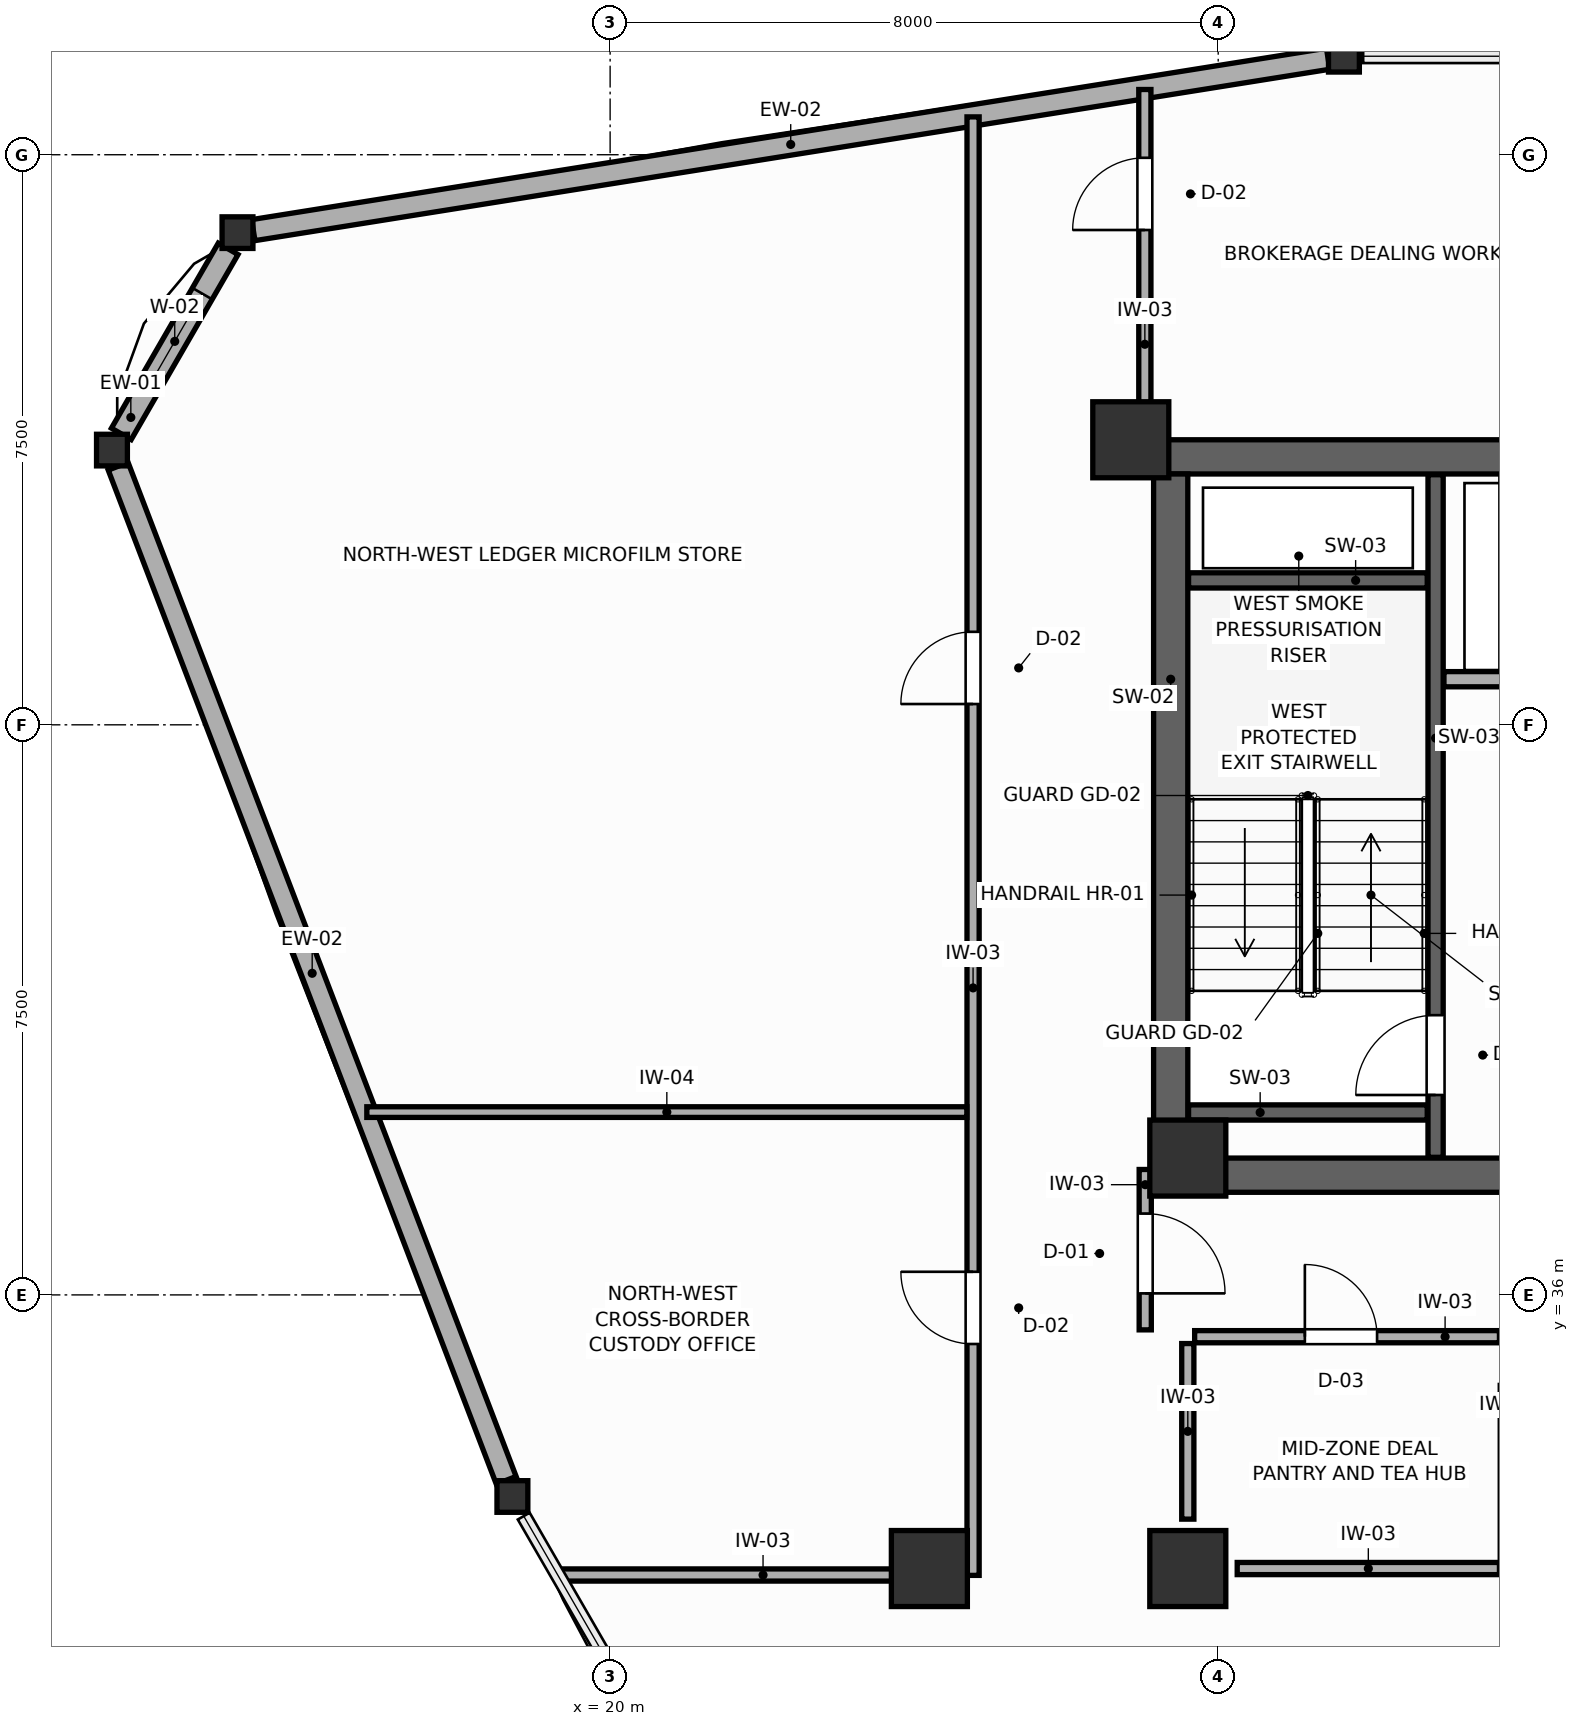
"""IFC4 building model, lengths in metres.
Left out: names, types, materials, properties, quantities, classifications, styles, units other than length and angle.
Written with IfcOpenShell. Run it as: python <this file> out.ifc"""

import sys

from ifc_helpers import new_model, si_unit, direction, frame, frame_2d, origin, origin_2d, place, context, subcontext, project, spatial, rectangle, i_section, extrude, source, transform, mapped, element, fill, save


model = new_model("IFC4")
c1 = context("Model", 3, precision=1e-05, world=origin(), true_north=direction((0.0, 1.0)))
c2 = subcontext(c1, "Body", "Model", "MODEL_VIEW")
j1 = project(units=[si_unit("LENGTHUNIT", "METRE"), si_unit("PLANEANGLEUNIT", "RADIAN")], contexts=[c1])
p1 = place(None, origin())
s1 = spatial("IfcSite", under=j1, at=p1, CompositionType="ELEMENT")
p2 = place(p1, origin())
s2 = spatial("IfcBuilding", under=s1, at=p2, CompositionType="ELEMENT")
p3 = place(p2, frame((0.0, 0.0, 172.2)))
s3 = spatial("IfcBuildingStorey", under=s2, at=p3, CompositionType="ELEMENT", Elevation=172.2)
p4 = place(p3, frame((27.15, 47.025, 0.0), z_axis=(0.0, 0.0, 1.0), x_axis=(1.0, 0.0, 0.0)))
e1 = element("IfcWall", 1, at=p4, inside=s3, PredefinedType="SHEAR", context=c2, shape_type="SweptSolid", body=[
    extrude(rectangle(XDim=17.7, YDim=0.45, at=frame_2d((8.85, 0.0))), origin(), (0.0, 0.0, 1.0), 3.6),
])
p5 = place(p3, frame((27.15, 37.575, 0.0), z_axis=(0.0, 0.0, 1.0), x_axis=(1.0, 0.0, 0.0)))
e2 = element("IfcWall", 2, at=p5, inside=s3, PredefinedType="SHEAR", context=c2, shape_type="SweptSolid", body=[
    extrude(rectangle(XDim=17.7, YDim=0.45, at=frame_2d((8.85, 0.0))), origin(), (0.0, 0.0, 1.0), 3.6),
])
p6 = place(p5, frame((4.875, 0.0, 0.0)))
e3 = element("IfcOpeningElement", 3, at=p6, cuts=e2, PredefinedType="OPENING", context=c2, shape_type="SweptSolid", body=[
    extrude(rectangle(XDim=1.05, YDim=2.1, at=frame_2d((0.525, 1.05))), frame((0.0, 0.235, 0.0), z_axis=(0.0, -1.0, 0.0), x_axis=(1.0, 0.0, 0.0)), (0.0, 0.0, 1.0), 0.47),
])
p7 = place(p5, frame((11.775, 0.0, 0.0)))
e4 = element("IfcOpeningElement", 4, at=p7, cuts=e2, PredefinedType="OPENING", context=c2, shape_type="SweptSolid", body=[
    extrude(rectangle(XDim=1.05, YDim=2.1, at=frame_2d((0.525, 1.05))), frame((0.0, 0.235, 0.0), z_axis=(0.0, -1.0, 0.0), x_axis=(1.0, 0.0, 0.0)), (0.0, 0.0, 1.0), 0.47),
])
p8 = place(p3, frame((27.375, 37.8, 0.0), z_axis=(0.0, 0.0, 1.0), x_axis=(0.0, 1.0, 0.0)))
e5 = element("IfcWall", 5, at=p8, inside=s3, PredefinedType="SHEAR", context=c2, shape_type="SweptSolid", body=[
    extrude(rectangle(XDim=9.0, YDim=0.45, at=frame_2d((4.5, 0.0))), origin(), (0.0, 0.0, 1.0), 3.6),
])
m1 = source(origin(), c2, "Body", "SweptSolid", [
    extrude(rectangle(XDim=1.0, YDim=1.0, at=origin_2d()), origin(), (0.0, 0.0, 1.0), 3.6),
])
for number, where, z_axis, x_axis in (
    (6, (26.85, 47.25, 0.0), (0.0, 0.0, 1.0), (1.0, 0.0, 0.0)),
    (7, (27.6, 37.8, 0.0), (0.0, 0.0, 1.0), (1.0, 0.0, 0.0)),
    (8, (27.6, 32.4, 0.0), (0.0, 0.0, 1.0), (1.0, 0.0, 0.0)),
    (9, (24.2, 32.4, 0.0), (0.0, 0.0, 1.0), (1.0, 0.0, 0.0)),
):
    element("IfcColumn", number, at=place(p3, frame(where, z_axis=z_axis, x_axis=x_axis)), inside=s3, PredefinedType="COLUMN", context=c2, shape_type="MappedRepresentation", body=[
        mapped(m1, transform((0.0, 0.0, 0.0), scale=1.0)),
    ])
m2 = source(origin(), c2, "Body", "SweptSolid", [
    extrude(i_section(OverallWidth=0.406, OverallDepth=0.416, WebThickness=0.027, FlangeThickness=0.044, FilletRadius=0.015, at=origin_2d()), origin(), (0.0, 0.0, 1.0), 3.6),
])
for number, where, z_axis, x_axis in (
    (10, (29.654, 52.296, 0.0), (0.0, 0.0, 1.0), (1.0, 0.0, 0.0)),
    (11, (15.098, 49.975, 0.0), (0.0, 0.0, 1.0), (1.0, 0.0, 0.0)),
    (12, (13.446, 47.115, 0.0), (0.0, 0.0, 1.0), (1.0, 0.0, 0.0)),
    (13, (18.714, 33.348, 0.0), (0.0, 0.0, 1.0), (1.0, 0.0, 0.0)),
):
    element("IfcColumn", number, at=place(p3, frame(where, z_axis=z_axis, x_axis=x_axis)), inside=s3, PredefinedType="COLUMN", context=c2, shape_type="MappedRepresentation", body=[
        mapped(m2, transform((0.0, 0.0, 0.0), scale=1.0)),
    ])
p9 = place(p3, frame((29.446, 52.263, 0.0), z_axis=(0.0, 0.0, 1.0), x_axis=(-0.987528363291, -0.157441200757, 0.0)))
e14 = element("IfcWall", 14, at=p9, inside=s3, PredefinedType="SOLIDWALL", context=c2, shape_type="SweptSolid", body=[
    extrude(rectangle(XDim=14.319, YDim=0.28, at=frame_2d((7.159, 0.0))), origin(), (0.0, 0.0, 1.0), 2.95),
])
p10 = place(p3, frame((14.975, 49.762, 0.0), z_axis=(0.0, 0.0, 1.0), x_axis=(-0.499978056798, -0.866038072327, 0.0)))
e15 = element("IfcWall", 15, at=p10, inside=s3, PredefinedType="SOLIDWALL", context=c2, shape_type="SweptSolid", body=[
    extrude(rectangle(XDim=2.811, YDim=0.3, at=frame_2d((1.406, 0.0))), origin(), (0.0, 0.0, 1.0), 3.01),
])
p11 = place(p10, frame((0.681, 0.0, 0.75)))
e16 = element("IfcOpeningElement", 16, at=p11, cuts=e15, PredefinedType="OPENING", context=c2, shape_type="SweptSolid", body=[
    extrude(rectangle(XDim=1.45, YDim=1.65, at=frame_2d((0.725, 0.825))), frame((0.0, 0.16, 0.0), z_axis=(0.0, -1.0, 0.0), x_axis=(1.0, 0.0, 0.0)), (0.0, 0.0, 1.0), 0.32),
])
p12 = place(p3, frame((13.528, 46.901, 0.0), z_axis=(0.0, 0.0, 1.0), x_axis=(0.357407179744, -0.933948664471, 0.0)))
e17 = element("IfcWall", 17, at=p12, inside=s3, PredefinedType="SOLIDWALL", context=c2, shape_type="SweptSolid", body=[
    extrude(rectangle(XDim=14.284, YDim=0.28, at=frame_2d((7.142, 0.0))), origin(), (0.0, 0.0, 1.0), 2.95),
])
p13 = place(p3, frame((30.86, 37.81, 0.0), z_axis=(0.0, 0.0, 1.0), x_axis=(0.0, 1.0, 0.0)))
e18 = element("IfcWall", 18, at=p13, inside=s3, PredefinedType="SHEAR", context=c2, shape_type="SweptSolid", body=[
    extrude(rectangle(XDim=8.98, YDim=0.2, at=frame_2d((4.49, 0.0))), origin(), (0.0, 0.0, 1.0), 3.6),
])
p14 = place(p13, frame((0.82, 0.0, 0.0)))
e19 = element("IfcOpeningElement", 19, at=p14, cuts=e18, PredefinedType="OPENING", context=c2, shape_type="SweptSolid", body=[
    extrude(rectangle(XDim=1.05, YDim=2.1, at=frame_2d((0.525, 1.05))), frame((0.0, 0.11, 0.0), z_axis=(0.0, -1.0, 0.0), x_axis=(1.0, 0.0, 0.0)), (0.0, 0.0, 1.0), 0.22),
])
for number, where, z_axis, x_axis in (
    (20, (27.61, 45.4, 0.0), (0.0, 0.0, 1.0), (1.0, 0.0, 0.0)),
    (21, (27.61, 38.4, 0.0), (0.0, 0.0, 1.0), (1.0, 0.0, 0.0)),
):
    element("IfcWall", number, at=place(p3, frame(where, z_axis=z_axis, x_axis=x_axis)), inside=s3, PredefinedType="SHEAR", context=c2, shape_type="SweptSolid", body=[
        extrude(rectangle(XDim=3.14, YDim=0.2, at=frame_2d((1.57, 0.0))), origin(), (0.0, 0.0, 1.0), 3.6),
    ])
p15 = place(p3, frame((30.97, 44.1, 0.0), z_axis=(0.0, 0.0, 1.0), x_axis=(1.0, 0.0, 0.0)))
e22 = element("IfcWall", 22, at=p15, inside=s3, PredefinedType="PARTITIONING", context=c2, shape_type="SweptSolid", body=[
    extrude(rectangle(XDim=3.38, YDim=0.2, at=frame_2d((1.69, 0.0))), origin(), (0.0, 0.0, 1.0), 3.4),
])
p16 = place(p15, frame((0.9, 0.0, 0.0)))
e23 = element("IfcOpeningElement", 23, at=p16, cuts=e22, PredefinedType="OPENING", context=c2, shape_type="SweptSolid", body=[
    extrude(rectangle(XDim=1.2, YDim=2.1, at=frame_2d((0.6, 1.05))), frame((0.0, 0.11, 0.0), z_axis=(0.0, -1.0, 0.0), x_axis=(1.0, 0.0, 0.0)), (0.0, 0.0, 1.0), 0.22),
])
p17 = place(p3, frame((28.25, 32.4, 0.0), z_axis=(0.0, 0.0, 1.0), x_axis=(1.0, 0.0, 0.0)))
e24 = element("IfcWall", 24, at=p17, inside=s3, PredefinedType="PARTITIONING", context=c2, shape_type="SweptSolid", body=[
    extrude(rectangle(XDim=3.45, YDim=0.16, at=frame_2d((1.725, 0.0))), origin(), (0.0, 0.0, 1.0), 2.95),
])
p18 = place(p3, frame((27.6, 33.05, 0.0), z_axis=(0.0, 0.0, 1.0), x_axis=(0.0, 1.0, 0.0)))
e25 = element("IfcWall", 25, at=p18, inside=s3, PredefinedType="PARTITIONING", context=c2, shape_type="SweptSolid", body=[
    extrude(rectangle(XDim=2.31, YDim=0.16, at=frame_2d((1.155, 0.0))), origin(), (0.0, 0.0, 1.0), 3.4),
])
p19 = place(p3, frame((27.69, 35.45, 0.0), z_axis=(0.0, 0.0, 1.0), x_axis=(1.0, 0.0, 0.0)))
e26 = element("IfcWall", 26, at=p19, inside=s3, PredefinedType="PARTITIONING", context=c2, shape_type="SweptSolid", body=[
    extrude(rectangle(XDim=4.01, YDim=0.16, at=frame_2d((2.005, 0.0))), origin(), (0.0, 0.0, 1.0), 3.4),
])
p20 = place(p19, frame((1.45, 0.0, 0.0)))
e27 = element("IfcOpeningElement", 27, at=p20, cuts=e26, PredefinedType="OPENING", context=c2, shape_type="SweptSolid", body=[
    extrude(rectangle(XDim=0.95, YDim=2.05, at=frame_2d((0.475, 1.025))), frame((0.0, 0.09, 0.0), z_axis=(0.0, -1.0, 0.0), x_axis=(1.0, 0.0, 0.0)), (0.0, 0.0, 1.0), 0.18),
])
p21 = place(p3, frame((27.04, 35.54, 0.0), z_axis=(0.0, 0.0, 1.0), x_axis=(0.0, 1.0, 0.0)))
e28 = element("IfcWall", 28, at=p21, inside=s3, PredefinedType="PARTITIONING", context=c2, shape_type="SweptSolid", body=[
    extrude(rectangle(XDim=2.11, YDim=0.16, at=frame_2d((1.055, 0.0))), origin(), (0.0, 0.0, 1.0), 3.4),
])
p22 = place(p21, frame((0.48, 0.0, 0.0)))
e29 = element("IfcOpeningElement", 29, at=p22, cuts=e28, PredefinedType="OPENING", context=c2, shape_type="SweptSolid", body=[
    extrude(rectangle(XDim=1.05, YDim=2.1, at=frame_2d((0.525, 1.05))), frame((0.0, 0.09, 0.0), z_axis=(0.0, -1.0, 0.0), x_axis=(1.0, 0.0, 0.0)), (0.0, 0.0, 1.0), 0.18),
])
p23 = place(p3, frame((24.775, 32.31, 0.0), z_axis=(0.0, 0.0, 1.0), x_axis=(0.0, 1.0, 0.0)))
e30 = element("IfcWall", 30, at=p23, inside=s3, PredefinedType="PARTITIONING", context=c2, shape_type="SweptSolid", body=[
    extrude(rectangle(XDim=19.188, YDim=0.16, at=frame_2d((9.594, 0.0))), origin(), (0.0, 0.0, 1.0), 3.4),
])
p24 = place(p23, frame((3.044, 0.0, 0.0)))
e31 = element("IfcOpeningElement", 31, at=p24, cuts=e30, PredefinedType="OPENING", context=c2, shape_type="SweptSolid", body=[
    extrude(rectangle(XDim=0.95, YDim=2.05, at=frame_2d((0.475, 1.025))), frame((0.0, 0.09, 0.0), z_axis=(0.0, -1.0, 0.0), x_axis=(1.0, 0.0, 0.0)), (0.0, 0.0, 1.0), 0.18),
])
p25 = place(p23, frame((11.463, 0.0, 0.0)))
e32 = element("IfcOpeningElement", 32, at=p25, cuts=e30, PredefinedType="OPENING", context=c2, shape_type="SweptSolid", body=[
    extrude(rectangle(XDim=0.95, YDim=2.05, at=frame_2d((0.475, 1.025))), frame((0.0, 0.09, 0.0), z_axis=(0.0, -1.0, 0.0), x_axis=(1.0, 0.0, 0.0)), (0.0, 0.0, 1.0), 0.18),
])
p26 = place(p3, frame((19.331, 32.315, 0.0), z_axis=(0.0, 0.0, 1.0), x_axis=(1.0, 0.0, 0.0)))
e33 = element("IfcWall", 33, at=p26, inside=s3, PredefinedType="PARTITIONING", context=c2, shape_type="SweptSolid", body=[
    extrude(rectangle(XDim=5.362, YDim=0.16, at=frame_2d((2.681, 0.0))), origin(), (0.0, 0.0, 1.0), 2.95),
])
p27 = place(p3, frame((27.035, 47.183, 0.0), z_axis=(0.0, 0.0, 1.0), x_axis=(0.0, 1.0, 0.0)))
e34 = element("IfcWall", 34, at=p27, inside=s3, PredefinedType="PARTITIONING", context=c2, shape_type="SweptSolid", body=[
    extrude(rectangle(XDim=4.675, YDim=0.16, at=frame_2d((2.337, 0.0))), origin(), (0.0, 0.0, 1.0), 3.4),
])
p28 = place(p27, frame((2.827, 0.0, 0.0)))
e35 = element("IfcOpeningElement", 35, at=p28, cuts=e34, PredefinedType="OPENING", context=c2, shape_type="SweptSolid", body=[
    extrude(rectangle(XDim=0.95, YDim=2.05, at=frame_2d((0.475, 1.025))), frame((0.0, 0.09, 0.0), z_axis=(0.0, -1.0, 0.0), x_axis=(1.0, 0.0, 0.0)), (0.0, 0.0, 1.0), 0.18),
])
p29 = place(p3, frame((16.799, 38.405, 0.0), z_axis=(0.0, 0.0, 1.0), x_axis=(1.0, 0.0, 0.0)))
e36 = element("IfcWall", 36, at=p29, inside=s3, PredefinedType="PARTITIONING", context=c2, shape_type="SweptSolid", body=[
    extrude(rectangle(XDim=7.894, YDim=0.14, at=frame_2d((3.947, 0.0))), origin(), (0.0, 0.0, 1.0), 3.4),
])
p30 = place(p11, origin())
e37 = element("IfcWindow", 37, at=p30, inside=s3, PartitioningType="SINGLE_PANEL", PredefinedType="WINDOW", context=c2, shape_type="SweptSolid", body=[
    extrude(rectangle(XDim=1.45, YDim=1.65, at=frame_2d((0.725, 0.825))), frame((0.0, 0.03, 0.0), z_axis=(0.0, -1.0, 0.0), x_axis=(1.0, 0.0, 0.0)), (0.0, 0.0, 1.0), 0.06),
])
fill(e16, e37)
p31 = place(p14, origin())
e38 = element("IfcDoor", 38, at=p31, inside=s3, OperationType="SINGLE_SWING_LEFT", PredefinedType="DOOR", context=c2, shape_type="SweptSolid", body=[
    extrude(rectangle(XDim=1.05, YDim=2.1, at=frame_2d((0.525, 1.05))), frame((0.0, 0.025, 0.0), z_axis=(0.0, -1.0, 0.0), x_axis=(1.0, 0.0, 0.0)), (0.0, 0.0, 1.0), 0.05),
])
fill(e19, e38)
p32 = place(p20, origin())
e39 = element("IfcDoor", 39, at=p32, inside=s3, OperationType="SINGLE_SWING_LEFT", PredefinedType="DOOR", context=c2, shape_type="SweptSolid", body=[
    extrude(rectangle(XDim=0.95, YDim=2.05, at=frame_2d((0.475, 1.025))), frame((0.0, 0.025, 0.0), z_axis=(0.0, -1.0, 0.0), x_axis=(1.0, 0.0, 0.0)), (0.0, 0.0, 1.0), 0.05),
])
fill(e27, e39)
p33 = place(p22, frame((1.05, 0.0, 0.0), z_axis=(0.0, 0.0, 1.0), x_axis=(-1.0, 0.0, 0.0)))
e40 = element("IfcDoor", 40, at=p33, inside=s3, OperationType="SINGLE_SWING_RIGHT", PredefinedType="DOOR", context=c2, shape_type="SweptSolid", body=[
    extrude(rectangle(XDim=1.05, YDim=2.1, at=frame_2d((0.525, 1.05))), frame((0.0, 0.025, 0.0), z_axis=(0.0, -1.0, 0.0), x_axis=(1.0, 0.0, 0.0)), (0.0, 0.0, 1.0), 0.05),
])
fill(e29, e40)
p34 = place(p24, origin())
e41 = element("IfcDoor", 41, at=p34, inside=s3, OperationType="SINGLE_SWING_RIGHT", PredefinedType="DOOR", context=c2, shape_type="SweptSolid", body=[
    extrude(rectangle(XDim=0.95, YDim=2.05, at=frame_2d((0.475, 1.025))), frame((0.0, 0.025, 0.0), z_axis=(0.0, -1.0, 0.0), x_axis=(1.0, 0.0, 0.0)), (0.0, 0.0, 1.0), 0.05),
])
fill(e31, e41)
p35 = place(p25, origin())
e42 = element("IfcDoor", 42, at=p35, inside=s3, OperationType="SINGLE_SWING_LEFT", PredefinedType="DOOR", context=c2, shape_type="SweptSolid", body=[
    extrude(rectangle(XDim=0.95, YDim=2.05, at=frame_2d((0.475, 1.025))), frame((0.0, 0.025, 0.0), z_axis=(0.0, -1.0, 0.0), x_axis=(1.0, 0.0, 0.0)), (0.0, 0.0, 1.0), 0.05),
])
fill(e32, e42)
p36 = place(p28, origin())
e43 = element("IfcDoor", 43, at=p36, inside=s3, OperationType="SINGLE_SWING_LEFT", PredefinedType="DOOR", context=c2, shape_type="SweptSolid", body=[
    extrude(rectangle(XDim=0.95, YDim=2.05, at=frame_2d((0.475, 1.025))), frame((0.0, 0.025, 0.0), z_axis=(0.0, -1.0, 0.0), x_axis=(1.0, 0.0, 0.0)), (0.0, 0.0, 1.0), 0.05),
])
fill(e35, e43)
save(model, sys.argv[1])
